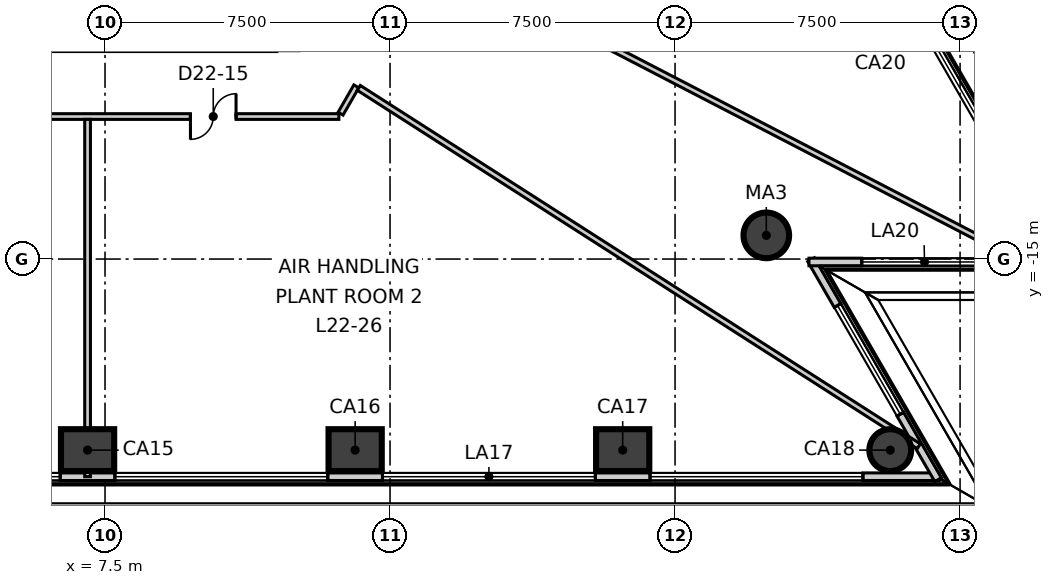
"""IFC4 building model, lengths in metres.
Left out: names, types, materials, properties, quantities, classifications, styles, units other than length and angle.
Written with IfcOpenShell. Run it as: python <this file> out.ifc"""

import sys

from ifc_helpers import new_model, si_unit, direction, frame, frame_2d, origin, origin_2d, place, context, subcontext, project, spatial, rectangle, circle, extrude, element, fill, save


model = new_model("IFC4")
c1 = context("Model", 3, precision=1e-05, world=origin(), true_north=direction((0.0, 1.0)))
c2 = subcontext(c1, "Body", "Model", "MODEL_VIEW")
j1 = project(units=[si_unit("LENGTHUNIT", "METRE"), si_unit("PLANEANGLEUNIT", "RADIAN")], contexts=[c1])
p1 = place(None, origin())
s1 = spatial("IfcSite", under=j1, at=p1, CompositionType="ELEMENT")
p2 = place(p1, origin())
s2 = spatial("IfcBuilding", under=s1, at=p2, CompositionType="ELEMENT")
p3 = place(p2, frame((0.0, 0.0, 99.8)))
s3 = spatial("IfcBuildingStorey", under=s2, at=p3, CompositionType="ELEMENT", Elevation=99.8)
for number, where, z_axis, x_axis in (
    (1, (7.041, -20.027, -0.6), (0.0, 0.0, 1.0), (1.0, 0.0, 0.0)),
    (2, (14.082, -20.027, -0.6), (0.0, 0.0, 1.0), (1.0, 0.0, 0.0)),
    (3, (21.122, -20.027, -0.6), (0.0, 0.0, 1.0), (1.0, 0.0, 0.0)),
):
    element("IfcColumn", number, at=place(p3, frame(where, z_axis=z_axis, x_axis=x_axis)), inside=s3, PredefinedType="COLUMN", context=c2, shape_type="SweptSolid", body=[
        extrude(rectangle(XDim=1.4, YDim=1.1, at=origin_2d()), origin(), (0.0, 0.0, 1.0), 4.8),
    ])
p4 = place(p3, frame((28.163, -20.027, -0.6), z_axis=(0.0, 0.0, 1.0), x_axis=(1.0, 0.0, 0.0)))
e4 = element("IfcColumn", 4, at=p4, inside=s3, PredefinedType="COLUMN", context=c2, shape_type="SweptSolid", body=[
    extrude(circle(Radius=0.55, at=origin_2d()), origin(), (0.0, 0.0, 1.0), 4.8),
])
p5 = place(p3, frame((24.901, -14.377, -0.6), z_axis=(0.0, 0.0, 1.0), x_axis=(1.0, 0.0, 0.0)))
e5 = element("IfcColumn", 5, at=p5, inside=s3, PredefinedType="COLUMN", context=c2, shape_type="SweptSolid", body=[
    extrude(circle(Radius=0.6, at=origin_2d()), origin(), (0.0, 0.0, 1.0), 4.8),
])
p6 = place(p3, frame((-29.466, -20.727, 0.0), z_axis=(0.0, 0.0, 1.0), x_axis=(1.0, 0.0, 0.0)))
e6 = element("IfcWall", 6, at=p6, inside=s3, PredefinedType="ELEMENTEDWALL", context=c2, shape_type="SweptSolid", body=[
    extrude(rectangle(XDim=58.912, YDim=0.2, at=frame_2d((29.456, 0.0))), origin(), (0.0, 0.0, 1.0), 4.2),
])
p7 = place(p6, frame((2.023, 0.0, 0.6)))
e7 = element("IfcOpeningElement", 7, at=p7, cuts=e6, PredefinedType="OPENING", context=c2, shape_type="SweptSolid", body=[
    extrude(rectangle(XDim=5.6, YDim=3.0, at=frame_2d((2.8, 1.5))), frame((0.0, 0.11, 0.0), z_axis=(0.0, -1.0, 0.0), x_axis=(1.0, 0.0, 0.0)), (0.0, 0.0, 1.0), 0.22),
])
p8 = place(p6, frame((9.064, 0.0, 0.6)))
e8 = element("IfcOpeningElement", 8, at=p8, cuts=e6, PredefinedType="OPENING", context=c2, shape_type="SweptSolid", body=[
    extrude(rectangle(XDim=5.6, YDim=3.0, at=frame_2d((2.8, 1.5))), frame((0.0, 0.11, 0.0), z_axis=(0.0, -1.0, 0.0), x_axis=(1.0, 0.0, 0.0)), (0.0, 0.0, 1.0), 0.22),
])
p9 = place(p6, frame((16.105, 0.0, 0.6)))
e9 = element("IfcOpeningElement", 9, at=p9, cuts=e6, PredefinedType="OPENING", context=c2, shape_type="SweptSolid", body=[
    extrude(rectangle(XDim=5.6, YDim=3.0, at=frame_2d((2.8, 1.5))), frame((0.0, 0.11, 0.0), z_axis=(0.0, -1.0, 0.0), x_axis=(1.0, 0.0, 0.0)), (0.0, 0.0, 1.0), 0.22),
])
p10 = place(p6, frame((23.146, 0.0, 0.6)))
e10 = element("IfcOpeningElement", 10, at=p10, cuts=e6, PredefinedType="OPENING", context=c2, shape_type="SweptSolid", body=[
    extrude(rectangle(XDim=5.6, YDim=3.0, at=frame_2d((2.8, 1.5))), frame((0.0, 0.11, 0.0), z_axis=(0.0, -1.0, 0.0), x_axis=(1.0, 0.0, 0.0)), (0.0, 0.0, 1.0), 0.22),
])
p11 = place(p6, frame((30.186, 0.0, 0.6)))
e11 = element("IfcOpeningElement", 11, at=p11, cuts=e6, PredefinedType="OPENING", context=c2, shape_type="SweptSolid", body=[
    extrude(rectangle(XDim=5.6, YDim=3.0, at=frame_2d((2.8, 1.5))), frame((0.0, 0.11, 0.0), z_axis=(0.0, -1.0, 0.0), x_axis=(1.0, 0.0, 0.0)), (0.0, 0.0, 1.0), 0.22),
])
p12 = place(p6, frame((37.227, 0.0, 0.6)))
e12 = element("IfcOpeningElement", 12, at=p12, cuts=e6, PredefinedType="OPENING", context=c2, shape_type="SweptSolid", body=[
    extrude(rectangle(XDim=5.6, YDim=3.0, at=frame_2d((2.8, 1.5))), frame((0.0, 0.11, 0.0), z_axis=(0.0, -1.0, 0.0), x_axis=(1.0, 0.0, 0.0)), (0.0, 0.0, 1.0), 0.22),
])
p13 = place(p6, frame((44.268, 0.0, 0.6)))
e13 = element("IfcOpeningElement", 13, at=p13, cuts=e6, PredefinedType="OPENING", context=c2, shape_type="SweptSolid", body=[
    extrude(rectangle(XDim=5.6, YDim=3.0, at=frame_2d((2.8, 1.5))), frame((0.0, 0.11, 0.0), z_axis=(0.0, -1.0, 0.0), x_axis=(1.0, 0.0, 0.0)), (0.0, 0.0, 1.0), 0.22),
])
p14 = place(p6, frame((51.309, 0.0, 0.6)))
e14 = element("IfcOpeningElement", 14, at=p14, cuts=e6, PredefinedType="OPENING", context=c2, shape_type="SweptSolid", body=[
    extrude(rectangle(XDim=5.6, YDim=3.0, at=frame_2d((2.8, 1.5))), frame((0.0, 0.11, 0.0), z_axis=(0.0, -1.0, 0.0), x_axis=(1.0, 0.0, 0.0)), (0.0, 0.0, 1.0), 0.22),
])
p15 = place(p3, frame((29.421, -20.805, 0.0), z_axis=(0.0, 0.0, 1.0), x_axis=(-0.499957477642, 0.866049952687, 0.0)))
e15 = element("IfcWall", 15, at=p15, inside=s3, PredefinedType="ELEMENTEDWALL", context=c2, shape_type="SweptSolid", body=[
    extrude(rectangle(XDim=6.684, YDim=0.2, at=frame_2d((3.342, 0.0))), origin(), (0.0, 0.0, 1.0), 4.2),
])
p16 = place(p15, frame((1.99, 0.0, 0.6)))
e16 = element("IfcOpeningElement", 16, at=p16, cuts=e15, PredefinedType="OPENING", context=c2, shape_type="SweptSolid", body=[
    extrude(rectangle(XDim=3.3, YDim=3.0, at=frame_2d((1.65, 1.5))), frame((0.0, 0.11, 0.0), z_axis=(0.0, -1.0, 0.0), x_axis=(1.0, 0.0, 0.0)), (0.0, 0.0, 1.0), 0.22),
])
p17 = place(p3, frame((26.024, -15.077, 0.0), z_axis=(0.0, 0.0, 1.0), x_axis=(1.0, 0.0, 0.0)))
e17 = element("IfcWall", 17, at=p17, inside=s3, PredefinedType="ELEMENTEDWALL", context=c2, shape_type="SweptSolid", body=[
    extrude(rectangle(XDim=6.684, YDim=0.2, at=frame_2d((3.342, 0.0))), origin(), (0.0, 0.0, 1.0), 4.2),
])
p18 = place(p17, frame((1.39, 0.0, 0.6)))
e18 = element("IfcOpeningElement", 18, at=p18, cuts=e17, PredefinedType="OPENING", context=c2, shape_type="SweptSolid", body=[
    extrude(rectangle(XDim=3.3, YDim=3.0, at=frame_2d((1.65, 1.5))), frame((0.0, 0.11, 0.0), z_axis=(0.0, -1.0, 0.0), x_axis=(1.0, 0.0, 0.0)), (0.0, 0.0, 1.0), 0.22),
])
p19 = place(p3, frame((32.683, -15.155, 0.0), z_axis=(0.0, 0.0, 1.0), x_axis=(-0.499995323711, 0.866028103624, 0.0)))
e19 = element("IfcWall", 19, at=p19, inside=s3, PredefinedType="ELEMENTEDWALL", context=c2, shape_type="SweptSolid", body=[
    extrude(rectangle(XDim=58.913, YDim=0.2, at=frame_2d((29.456, 0.0))), origin(), (0.0, 0.0, 1.0), 4.2),
])
p20 = place(p19, frame((2.023, 0.0, 0.6)))
e20 = element("IfcOpeningElement", 20, at=p20, cuts=e19, PredefinedType="OPENING", context=c2, shape_type="SweptSolid", body=[
    extrude(rectangle(XDim=5.6, YDim=3.0, at=frame_2d((2.8, 1.5))), frame((0.0, 0.11, 0.0), z_axis=(0.0, -1.0, 0.0), x_axis=(1.0, 0.0, 0.0)), (0.0, 0.0, 1.0), 0.22),
])
p21 = place(p19, frame((9.064, 0.0, 0.6)))
e21 = element("IfcOpeningElement", 21, at=p21, cuts=e19, PredefinedType="OPENING", context=c2, shape_type="SweptSolid", body=[
    extrude(rectangle(XDim=5.6, YDim=3.0, at=frame_2d((2.8, 1.5))), frame((0.0, 0.11, 0.0), z_axis=(0.0, -1.0, 0.0), x_axis=(1.0, 0.0, 0.0)), (0.0, 0.0, 1.0), 0.22),
])
p22 = place(p19, frame((16.105, 0.0, 0.6)))
e22 = element("IfcOpeningElement", 22, at=p22, cuts=e19, PredefinedType="OPENING", context=c2, shape_type="SweptSolid", body=[
    extrude(rectangle(XDim=5.6, YDim=3.0, at=frame_2d((2.8, 1.5))), frame((0.0, 0.11, 0.0), z_axis=(0.0, -1.0, 0.0), x_axis=(1.0, 0.0, 0.0)), (0.0, 0.0, 1.0), 0.22),
])
p23 = place(p19, frame((23.146, 0.0, 0.6)))
e23 = element("IfcOpeningElement", 23, at=p23, cuts=e19, PredefinedType="OPENING", context=c2, shape_type="SweptSolid", body=[
    extrude(rectangle(XDim=5.6, YDim=3.0, at=frame_2d((2.8, 1.5))), frame((0.0, 0.11, 0.0), z_axis=(0.0, -1.0, 0.0), x_axis=(1.0, 0.0, 0.0)), (0.0, 0.0, 1.0), 0.22),
])
p24 = place(p19, frame((30.187, 0.0, 0.6)))
e24 = element("IfcOpeningElement", 24, at=p24, cuts=e19, PredefinedType="OPENING", context=c2, shape_type="SweptSolid", body=[
    extrude(rectangle(XDim=5.6, YDim=3.0, at=frame_2d((2.8, 1.5))), frame((0.0, 0.11, 0.0), z_axis=(0.0, -1.0, 0.0), x_axis=(1.0, 0.0, 0.0)), (0.0, 0.0, 1.0), 0.22),
])
p25 = place(p19, frame((37.228, 0.0, 0.6)))
e25 = element("IfcOpeningElement", 25, at=p25, cuts=e19, PredefinedType="OPENING", context=c2, shape_type="SweptSolid", body=[
    extrude(rectangle(XDim=5.6, YDim=3.0, at=frame_2d((2.8, 1.5))), frame((0.0, 0.11, 0.0), z_axis=(0.0, -1.0, 0.0), x_axis=(1.0, 0.0, 0.0)), (0.0, 0.0, 1.0), 0.22),
])
p26 = place(p19, frame((44.268, 0.0, 0.6)))
e26 = element("IfcOpeningElement", 26, at=p26, cuts=e19, PredefinedType="OPENING", context=c2, shape_type="SweptSolid", body=[
    extrude(rectangle(XDim=5.6, YDim=3.0, at=frame_2d((2.8, 1.5))), frame((0.0, 0.11, 0.0), z_axis=(0.0, -1.0, 0.0), x_axis=(1.0, 0.0, 0.0)), (0.0, 0.0, 1.0), 0.22),
])
p27 = place(p19, frame((51.309, 0.0, 0.6)))
e27 = element("IfcOpeningElement", 27, at=p27, cuts=e19, PredefinedType="OPENING", context=c2, shape_type="SweptSolid", body=[
    extrude(rectangle(XDim=5.6, YDim=3.0, at=frame_2d((2.8, 1.5))), frame((0.0, 0.11, 0.0), z_axis=(0.0, -1.0, 0.0), x_axis=(1.0, 0.0, 0.0)), (0.0, 0.0, 1.0), 0.22),
])
p28 = place(p3, frame((-13.568, -11.25, 0.0), z_axis=(0.0, 0.0, 1.0), x_axis=(1.0, 0.0, 0.0)))
e28 = element("IfcWall", 28, at=p28, inside=s3, PredefinedType="PARTITIONING", context=c2, shape_type="SweptSolid", body=[
    extrude(rectangle(XDim=27.222, YDim=0.15, at=frame_2d((13.611, 0.0))), origin(), (0.0, 0.0, 1.0), 4.2),
])
p29 = place(p28, frame((2.62, 0.0, 0.0)))
e29 = element("IfcOpeningElement", 29, at=p29, cuts=e28, PredefinedType="OPENING", context=c2, shape_type="SweptSolid", body=[
    extrude(rectangle(XDim=1.2, YDim=2.1, at=frame_2d((0.6, 1.05))), frame((0.0, 0.085, 0.0), z_axis=(0.0, -1.0, 0.0), x_axis=(1.0, 0.0, 0.0)), (0.0, 0.0, 1.0), 0.17),
])
p30 = place(p28, frame((12.968, 0.0, 0.0)))
e30 = element("IfcOpeningElement", 30, at=p30, cuts=e28, PredefinedType="OPENING", context=c2, shape_type="SweptSolid", body=[
    extrude(rectangle(XDim=1.2, YDim=2.1, at=frame_2d((0.6, 1.05))), frame((0.0, 0.085, 0.0), z_axis=(0.0, -1.0, 0.0), x_axis=(1.0, 0.0, 0.0)), (0.0, 0.0, 1.0), 0.17),
])
p31 = place(p28, frame((23.316, 0.0, 0.0)))
e31 = element("IfcOpeningElement", 31, at=p31, cuts=e28, PredefinedType="OPENING", context=c2, shape_type="SweptSolid", body=[
    extrude(rectangle(XDim=1.2, YDim=2.1, at=frame_2d((0.6, 1.05))), frame((0.0, 0.085, 0.0), z_axis=(0.0, -1.0, 0.0), x_axis=(1.0, 0.0, 0.0)), (0.0, 0.0, 1.0), 0.17),
])
p32 = place(p3, frame((7.041, -20.727, 0.0), z_axis=(0.0, 0.0, 1.0), x_axis=(0.0, 1.0, 0.0)))
e32 = element("IfcWall", 32, at=p32, inside=s3, PredefinedType="PARTITIONING", context=c2, shape_type="SweptSolid", body=[
    extrude(rectangle(XDim=9.402, YDim=0.15, at=frame_2d((4.701, 0.0))), origin(), (0.0, 0.0, 1.0), 4.2),
])
p33 = place(p3, frame((13.698, -11.175, 0.0), z_axis=(0.0, 0.0, 1.0), x_axis=(0.499425709803, 0.866356716594, 0.0)))
e33 = element("IfcWall", 33, at=p33, inside=s3, PredefinedType="PARTITIONING", context=c2, shape_type="SweptSolid", body=[
    extrude(rectangle(XDim=0.831, YDim=0.15, at=frame_2d((0.416, 0.0))), origin(), (0.0, 0.0, 1.0), 4.2),
])
p34 = place(p3, frame((14.177, -10.495, 0.0), z_axis=(0.0, 0.0, 1.0), x_axis=(0.842276215782, -0.539046172724, 0.0)))
e34 = element("IfcWall", 34, at=p34, inside=s3, PredefinedType="PARTITIONING", context=c2, shape_type="SweptSolid", body=[
    extrude(rectangle(XDim=17.496, YDim=0.15, at=frame_2d((8.748, 0.0))), origin(), (0.0, 0.0, 1.0), 3.4),
])
p35 = place(p3, frame((16.176, -7.032, 0.0), z_axis=(0.0, 0.0, 1.0), x_axis=(0.887871998407, -0.460090550267, 0.0)))
e35 = element("IfcWall", 35, at=p35, inside=s3, PredefinedType="PARTITIONING", context=c2, shape_type="SweptSolid", body=[
    extrude(rectangle(XDim=17.486, YDim=0.15, at=frame_2d((8.743, 0.0))), origin(), (0.0, 0.0, 1.0), 3.4),
])
p36 = place(p11, origin())
e36 = element("IfcWindow", 36, at=p36, inside=s3, PartitioningType="SINGLE_PANEL", PredefinedType="WINDOW", context=c2, shape_type="SweptSolid", body=[
    extrude(rectangle(XDim=5.6, YDim=3.0, at=frame_2d((2.8, 1.5))), frame((0.0, 0.03, 0.0), z_axis=(0.0, -1.0, 0.0), x_axis=(1.0, 0.0, 0.0)), (0.0, 0.0, 1.0), 0.06),
])
fill(e11, e36)
p37 = place(p12, origin())
e37 = element("IfcWindow", 37, at=p37, inside=s3, PartitioningType="SINGLE_PANEL", PredefinedType="WINDOW", context=c2, shape_type="SweptSolid", body=[
    extrude(rectangle(XDim=5.6, YDim=3.0, at=frame_2d((2.8, 1.5))), frame((0.0, 0.03, 0.0), z_axis=(0.0, -1.0, 0.0), x_axis=(1.0, 0.0, 0.0)), (0.0, 0.0, 1.0), 0.06),
])
fill(e12, e37)
p38 = place(p13, origin())
e38 = element("IfcWindow", 38, at=p38, inside=s3, PartitioningType="SINGLE_PANEL", PredefinedType="WINDOW", context=c2, shape_type="SweptSolid", body=[
    extrude(rectangle(XDim=5.6, YDim=3.0, at=frame_2d((2.8, 1.5))), frame((0.0, 0.03, 0.0), z_axis=(0.0, -1.0, 0.0), x_axis=(1.0, 0.0, 0.0)), (0.0, 0.0, 1.0), 0.06),
])
fill(e13, e38)
p39 = place(p14, origin())
e39 = element("IfcWindow", 39, at=p39, inside=s3, PartitioningType="SINGLE_PANEL", PredefinedType="WINDOW", context=c2, shape_type="SweptSolid", body=[
    extrude(rectangle(XDim=5.6, YDim=3.0, at=frame_2d((2.8, 1.5))), frame((0.0, 0.03, 0.0), z_axis=(0.0, -1.0, 0.0), x_axis=(1.0, 0.0, 0.0)), (0.0, 0.0, 1.0), 0.06),
])
fill(e14, e39)
p40 = place(p16, origin())
e40 = element("IfcWindow", 40, at=p40, inside=s3, PartitioningType="SINGLE_PANEL", PredefinedType="WINDOW", context=c2, shape_type="SweptSolid", body=[
    extrude(rectangle(XDim=3.3, YDim=3.0, at=frame_2d((1.65, 1.5))), frame((0.0, 0.03, 0.0), z_axis=(0.0, -1.0, 0.0), x_axis=(1.0, 0.0, 0.0)), (0.0, 0.0, 1.0), 0.06),
])
fill(e16, e40)
p41 = place(p18, origin())
e41 = element("IfcWindow", 41, at=p41, inside=s3, PartitioningType="SINGLE_PANEL", PredefinedType="WINDOW", context=c2, shape_type="SweptSolid", body=[
    extrude(rectangle(XDim=3.3, YDim=3.0, at=frame_2d((1.65, 1.5))), frame((0.0, 0.03, 0.0), z_axis=(0.0, -1.0, 0.0), x_axis=(1.0, 0.0, 0.0)), (0.0, 0.0, 1.0), 0.06),
])
fill(e18, e41)
p42 = place(p20, origin())
e42 = element("IfcWindow", 42, at=p42, inside=s3, PartitioningType="SINGLE_PANEL", PredefinedType="WINDOW", context=c2, shape_type="SweptSolid", body=[
    extrude(rectangle(XDim=5.6, YDim=3.0, at=frame_2d((2.8, 1.5))), frame((0.0, 0.03, 0.0), z_axis=(0.0, -1.0, 0.0), x_axis=(1.0, 0.0, 0.0)), (0.0, 0.0, 1.0), 0.06),
])
fill(e20, e42)
p43 = place(p31, origin())
e43 = element("IfcDoor", 43, at=p43, inside=s3, OperationType="DOUBLE_DOOR_SINGLE_SWING", PredefinedType="DOOR", context=c2, shape_type="SweptSolid", body=[
    extrude(rectangle(XDim=1.2, YDim=2.1, at=frame_2d((0.6, 1.05))), frame((0.0, 0.025, 0.0), z_axis=(0.0, -1.0, 0.0), x_axis=(1.0, 0.0, 0.0)), (0.0, 0.0, 1.0), 0.05),
])
fill(e31, e43)
save(model, sys.argv[1])
